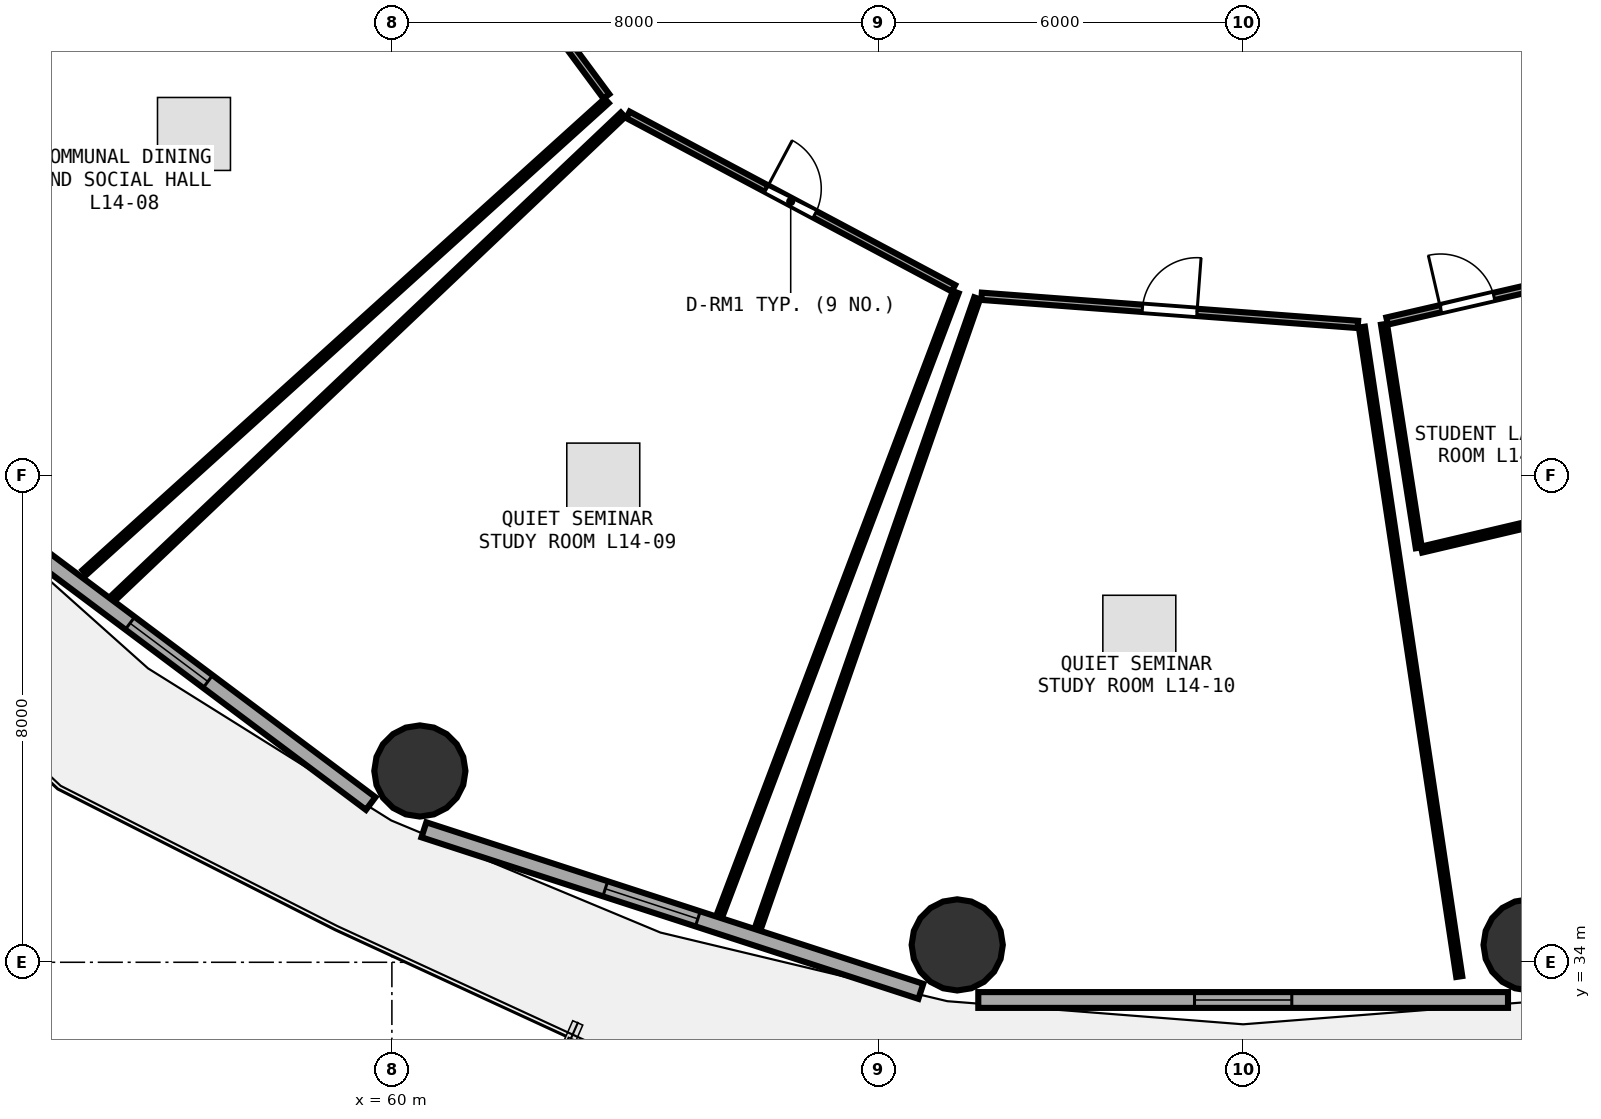
"""IFC4 building model, lengths in metres.
Left out: names, types, materials, properties, quantities, classifications, styles, units other than length and angle.
Written with IfcOpenShell. Run it as: python <this file> out.ifc"""

import sys

from ifc_helpers import new_model, si_unit, direction, frame, frame_2d, origin, origin_2d, place, context, subcontext, project, spatial, rectangle, circle, extrude, element, fill, save


model = new_model("IFC4")
c1 = context("Model", 3, precision=1e-05, world=origin(), true_north=direction((0.0, 1.0)))
c2 = subcontext(c1, "Body", "Model", "MODEL_VIEW")
j1 = project(units=[si_unit("LENGTHUNIT", "METRE"), si_unit("PLANEANGLEUNIT", "RADIAN")], contexts=[c1])
p1 = place(None, origin())
s1 = spatial("IfcSite", under=j1, at=p1, CompositionType="ELEMENT")
p2 = place(p1, origin())
s2 = spatial("IfcBuilding", under=s1, at=p2, CompositionType="ELEMENT")
p3 = place(p2, frame((0.0, 0.0, 56.25)))
s3 = spatial("IfcBuildingStorey", under=s2, at=p3, CompositionType="ELEMENT", Elevation=56.25)
for number, where, z_axis, x_axis in (
    (1, (60.46, 37.146, 0.0), (0.0, 0.0, 1.0), (1.0, 0.0, 0.0)),
    (2, (69.298, 34.286, 0.0), (0.0, 0.0, 1.0), (1.0, 0.0, 0.0)),
    (3, (78.702, 34.286, 0.0), (0.0, 0.0, 1.0), (1.0, 0.0, 0.0)),
):
    element("IfcColumn", number, at=place(p3, frame(where, z_axis=z_axis, x_axis=x_axis)), inside=s3, PredefinedType="COLUMN", context=c2, shape_type="SweptSolid", body=[
        extrude(circle(Radius=0.75, at=origin_2d()), origin(), (0.0, 0.0, 1.0), 3.75),
    ])
p4 = place(p3, frame((53.016, 41.582, 0.0), z_axis=(0.0, 0.0, 1.0), x_axis=(0.80030733173, -0.599590005569, 0.0)))
e4 = element("IfcWall", 4, at=p4, inside=s3, PredefinedType="SOLIDWALL", context=c2, shape_type="SweptSolid", body=[
    extrude(rectangle(XDim=8.291, YDim=0.26, at=frame_2d((4.145, 0.0))), origin(), (0.0, 0.0, 1.0), 3.475),
])
p5 = place(p4, frame((3.345, 0.0, 0.85)))
e5 = element("IfcOpeningElement", 5, at=p5, cuts=e4, PredefinedType="OPENING", context=c2, shape_type="SweptSolid", body=[
    extrude(rectangle(XDim=1.6, YDim=1.45, at=frame_2d((0.8, 0.725))), frame((0.0, 0.14, 0.0), z_axis=(0.0, -1.0, 0.0), x_axis=(1.0, 0.0, 0.0)), (0.0, 0.0, 1.0), 0.28),
])
p6 = place(p3, frame((60.526, 36.178, 0.0), z_axis=(0.0, 0.0, 1.0), x_axis=(0.951039914291, -0.309068085421, 0.0)))
e6 = element("IfcWall", 6, at=p6, inside=s3, PredefinedType="SOLIDWALL", context=c2, shape_type="SweptSolid", body=[
    extrude(rectangle(XDim=8.594, YDim=0.26, at=frame_2d((4.297, 0.0))), origin(), (0.0, 0.0, 1.0), 3.475),
])
p7 = place(p6, frame((3.137, 0.0, 0.85)))
e7 = element("IfcOpeningElement", 7, at=p7, cuts=e6, PredefinedType="OPENING", context=c2, shape_type="SweptSolid", body=[
    extrude(rectangle(XDim=1.6, YDim=1.45, at=frame_2d((0.8, 0.725))), frame((0.0, 0.14, 0.0), z_axis=(0.0, -1.0, 0.0), x_axis=(1.0, 0.0, 0.0)), (0.0, 0.0, 1.0), 0.28),
])
p8 = place(p3, frame((69.644, 33.38, 0.0), z_axis=(0.0, 0.0, 1.0), x_axis=(1.0, 0.0, 0.0)))
e8 = element("IfcWall", 8, at=p8, inside=s3, PredefinedType="SOLIDWALL", context=c2, shape_type="SweptSolid", body=[
    extrude(rectangle(XDim=8.712, YDim=0.26, at=frame_2d((4.356, 0.0))), origin(), (0.0, 0.0, 1.0), 3.475),
])
p9 = place(p8, frame((3.556, 0.0, 0.85)))
e9 = element("IfcOpeningElement", 9, at=p9, cuts=e8, PredefinedType="OPENING", context=c2, shape_type="SweptSolid", body=[
    extrude(rectangle(XDim=1.6, YDim=1.45, at=frame_2d((0.8, 0.725))), frame((0.0, 0.14, 0.0), z_axis=(0.0, -1.0, 0.0), x_axis=(1.0, 0.0, 0.0)), (0.0, 0.0, 1.0), 0.28),
])
p10 = place(p3, frame((60.071, 52.912, 0.0), z_axis=(0.0, 0.0, 1.0), x_axis=(0.594763174801, -0.80390096772, 0.0)))
e10 = element("IfcWall", 10, at=p10, inside=s3, PredefinedType="PARTITIONING", context=c2, shape_type="SweptSolid", body=[
    extrude(rectangle(XDim=5.81, YDim=0.12, at=frame_2d((2.905, 0.0))), origin(), (0.0, 0.0, 1.0), 2.875),
])
p11 = place(p10, frame((2.455, 0.0, 0.0)))
e11 = element("IfcOpeningElement", 11, at=p11, cuts=e10, PredefinedType="OPENING", context=c2, shape_type="SweptSolid", body=[
    extrude(rectangle(XDim=0.9, YDim=2.08, at=frame_2d((0.45, 1.04))), frame((0.0, 0.07, 0.0), z_axis=(0.0, -1.0, 0.0), x_axis=(1.0, 0.0, 0.0)), (0.0, 0.0, 1.0), 0.14),
])
p12 = place(p3, frame((63.882, 47.937, 0.0), z_axis=(0.0, 0.0, 1.0), x_axis=(0.882584601599, -0.470153614279, 0.0)))
e12 = element("IfcWall", 12, at=p12, inside=s3, PredefinedType="PARTITIONING", context=c2, shape_type="SweptSolid", body=[
    extrude(rectangle(XDim=6.065, YDim=0.12, at=frame_2d((3.033, 0.0))), origin(), (0.0, 0.0, 1.0), 2.875),
])
p13 = place(p12, frame((2.583, 0.0, 0.0)))
e13 = element("IfcOpeningElement", 13, at=p13, cuts=e12, PredefinedType="OPENING", context=c2, shape_type="SweptSolid", body=[
    extrude(rectangle(XDim=0.9, YDim=2.08, at=frame_2d((0.45, 1.04))), frame((0.0, 0.07, 0.0), z_axis=(0.0, -1.0, 0.0), x_axis=(1.0, 0.0, 0.0)), (0.0, 0.0, 1.0), 0.14),
])
p14 = place(p3, frame((69.698, 44.952, 0.0), z_axis=(0.0, 0.0, 1.0), x_axis=(0.997215128993, -0.074578726908, 0.0)))
e14 = element("IfcWall", 14, at=p14, inside=s3, PredefinedType="PARTITIONING", context=c2, shape_type="SweptSolid", body=[
    extrude(rectangle(XDim=6.207, YDim=0.12, at=frame_2d((3.104, 0.0))), origin(), (0.0, 0.0, 1.0), 3.235),
])
p15 = place(p14, frame((2.653, 0.0, 0.0)))
e15 = element("IfcOpeningElement", 15, at=p15, cuts=e14, PredefinedType="OPENING", context=c2, shape_type="SweptSolid", body=[
    extrude(rectangle(XDim=0.9, YDim=2.08, at=frame_2d((0.45, 1.04))), frame((0.0, 0.07, 0.0), z_axis=(0.0, -1.0, 0.0), x_axis=(1.0, 0.0, 0.0)), (0.0, 0.0, 1.0), 0.14),
])
p16 = place(p3, frame((76.368, 44.545, 0.0), z_axis=(0.0, 0.0, 1.0), x_axis=(0.974445966729, 0.224622033484, 0.0)))
e16 = element("IfcWall", 16, at=p16, inside=s3, PredefinedType="PARTITIONING", context=c2, shape_type="SweptSolid", body=[
    extrude(rectangle(XDim=2.703, YDim=0.12, at=frame_2d((1.352, 0.0))), origin(), (0.0, 0.0, 1.0), 3.235),
])
p17 = place(p16, frame((0.902, 0.0, 0.0)))
e17 = element("IfcOpeningElement", 17, at=p17, cuts=e16, PredefinedType="OPENING", context=c2, shape_type="SweptSolid", body=[
    extrude(rectangle(XDim=0.9, YDim=2.08, at=frame_2d((0.45, 1.04))), frame((0.0, 0.07, 0.0), z_axis=(0.0, -1.0, 0.0), x_axis=(1.0, 0.0, 0.0)), (0.0, 0.0, 1.0), 0.14),
])
p18 = place(p3, frame((63.532, 48.166, 0.0), z_axis=(0.0, 0.0, 1.0), x_axis=(-0.742191353367, -0.670188029577, 0.0)))
e18 = element("IfcWall", 18, at=p18, inside=s3, PredefinedType="PARTITIONING", context=c2, shape_type="SweptSolid", body=[
    extrude(rectangle(XDim=11.569, YDim=0.1, at=frame_2d((5.785, 0.0))), origin(), (0.0, 0.0, 1.0), 2.875),
])
p19 = place(p3, frame((69.274, 45.02, 0.0), z_axis=(0.0, 0.0, 1.0), x_axis=(-0.354325845477, -0.935122021571, 0.0)))
e19 = element("IfcWall", 19, at=p19, inside=s3, PredefinedType="PARTITIONING", context=c2, shape_type="SweptSolid", body=[
    extrude(rectangle(XDim=10.938, YDim=0.1, at=frame_2d((5.469, 0.0))), origin(), (0.0, 0.0, 1.0), 2.875),
])
p20 = place(p3, frame((55.433, 40.003, 0.0), z_axis=(0.0, 0.0, 1.0), x_axis=(0.725627678847, 0.688087546531, 0.0)))
e20 = element("IfcWall", 20, at=p20, inside=s3, PredefinedType="PARTITIONING", context=c2, shape_type="SweptSolid", body=[
    extrude(rectangle(XDim=11.531, YDim=0.1, at=frame_2d((5.765, 0.0))), origin(), (0.0, 0.0, 1.0), 2.875),
])
p21 = place(p3, frame((75.953, 44.445, 0.0), z_axis=(0.0, 0.0, 1.0), x_axis=(0.148282966471, -0.988944974129, 0.0)))
e21 = element("IfcWall", 21, at=p21, inside=s3, PredefinedType="PARTITIONING", context=c2, shape_type="SweptSolid", body=[
    extrude(rectangle(XDim=10.799, YDim=0.1, at=frame_2d((5.399, 0.0))), origin(), (0.0, 0.0, 1.0), 2.875),
])
p22 = place(p3, frame((66.038, 34.612, 0.0), z_axis=(0.0, 0.0, 1.0), x_axis=(0.328662915274, 0.944447292401, 0.0)))
e22 = element("IfcWall", 22, at=p22, inside=s3, PredefinedType="PARTITIONING", context=c2, shape_type="SweptSolid", body=[
    extrude(rectangle(XDim=10.914, YDim=0.1, at=frame_2d((5.457, 0.0))), origin(), (0.0, 0.0, 1.0), 2.875),
])
p23 = place(p3, frame((80.302, 41.579, 0.0), z_axis=(0.0, 0.0, 1.0), x_axis=(-0.973403286496, -0.229098323518, 0.0)))
e23 = element("IfcWall", 23, at=p23, inside=s3, PredefinedType="PARTITIONING", context=c2, shape_type="SweptSolid", body=[
    extrude(rectangle(XDim=3.46, YDim=0.1, at=frame_2d((1.73, 0.0))), origin(), (0.0, 0.0, 1.0), 2.875),
])
p24 = place(p3, frame((76.889, 40.816, 0.0), z_axis=(0.0, 0.0, 1.0), x_axis=(-0.153950475789, 0.988078565198, 0.0)))
e24 = element("IfcWall", 24, at=p24, inside=s3, PredefinedType="PARTITIONING", context=c2, shape_type="SweptSolid", body=[
    extrude(rectangle(XDim=3.72, YDim=0.1, at=frame_2d((1.86, 0.0))), origin(), (0.0, 0.0, 1.0), 3.175),
])
p25 = place(p5, origin())
e25 = element("IfcWindow", 25, at=p25, inside=s3, PartitioningType="SINGLE_PANEL", PredefinedType="WINDOW", context=c2, shape_type="SweptSolid", body=[
    extrude(rectangle(XDim=1.6, YDim=1.45, at=frame_2d((0.8, 0.725))), frame((0.0, 0.03, 0.0), z_axis=(0.0, -1.0, 0.0), x_axis=(1.0, 0.0, 0.0)), (0.0, 0.0, 1.0), 0.06),
])
fill(e5, e25)
p26 = place(p7, origin())
e26 = element("IfcWindow", 26, at=p26, inside=s3, PartitioningType="SINGLE_PANEL", PredefinedType="WINDOW", context=c2, shape_type="SweptSolid", body=[
    extrude(rectangle(XDim=1.6, YDim=1.45, at=frame_2d((0.8, 0.725))), frame((0.0, 0.03, 0.0), z_axis=(0.0, -1.0, 0.0), x_axis=(1.0, 0.0, 0.0)), (0.0, 0.0, 1.0), 0.06),
])
fill(e7, e26)
p27 = place(p9, origin())
e27 = element("IfcWindow", 27, at=p27, inside=s3, PartitioningType="SINGLE_PANEL", PredefinedType="WINDOW", context=c2, shape_type="SweptSolid", body=[
    extrude(rectangle(XDim=1.6, YDim=1.45, at=frame_2d((0.8, 0.725))), frame((0.0, 0.03, 0.0), z_axis=(0.0, -1.0, 0.0), x_axis=(1.0, 0.0, 0.0)), (0.0, 0.0, 1.0), 0.06),
])
fill(e9, e27)
p28 = place(p13, origin())
e28 = element("IfcDoor", 28, at=p28, inside=s3, OperationType="SINGLE_SWING_LEFT", PredefinedType="DOOR", context=c2, shape_type="SweptSolid", body=[
    extrude(rectangle(XDim=0.9, YDim=2.08, at=frame_2d((0.45, 1.04))), frame((0.0, 0.025, 0.0), z_axis=(0.0, -1.0, 0.0), x_axis=(1.0, 0.0, 0.0)), (0.0, 0.0, 1.0), 0.05),
])
fill(e13, e28)
p29 = place(p15, origin())
e29 = element("IfcDoor", 29, at=p29, inside=s3, OperationType="SINGLE_SWING_RIGHT", PredefinedType="DOOR", context=c2, shape_type="SweptSolid", body=[
    extrude(rectangle(XDim=0.9, YDim=2.08, at=frame_2d((0.45, 1.04))), frame((0.0, 0.025, 0.0), z_axis=(0.0, -1.0, 0.0), x_axis=(1.0, 0.0, 0.0)), (0.0, 0.0, 1.0), 0.05),
])
fill(e15, e29)
p30 = place(p17, origin())
e30 = element("IfcDoor", 30, at=p30, inside=s3, OperationType="SINGLE_SWING_LEFT", PredefinedType="DOOR", context=c2, shape_type="SweptSolid", body=[
    extrude(rectangle(XDim=0.9, YDim=2.08, at=frame_2d((0.45, 1.04))), frame((0.0, 0.025, 0.0), z_axis=(0.0, -1.0, 0.0), x_axis=(1.0, 0.0, 0.0)), (0.0, 0.0, 1.0), 0.05),
])
fill(e17, e30)
save(model, sys.argv[1])
